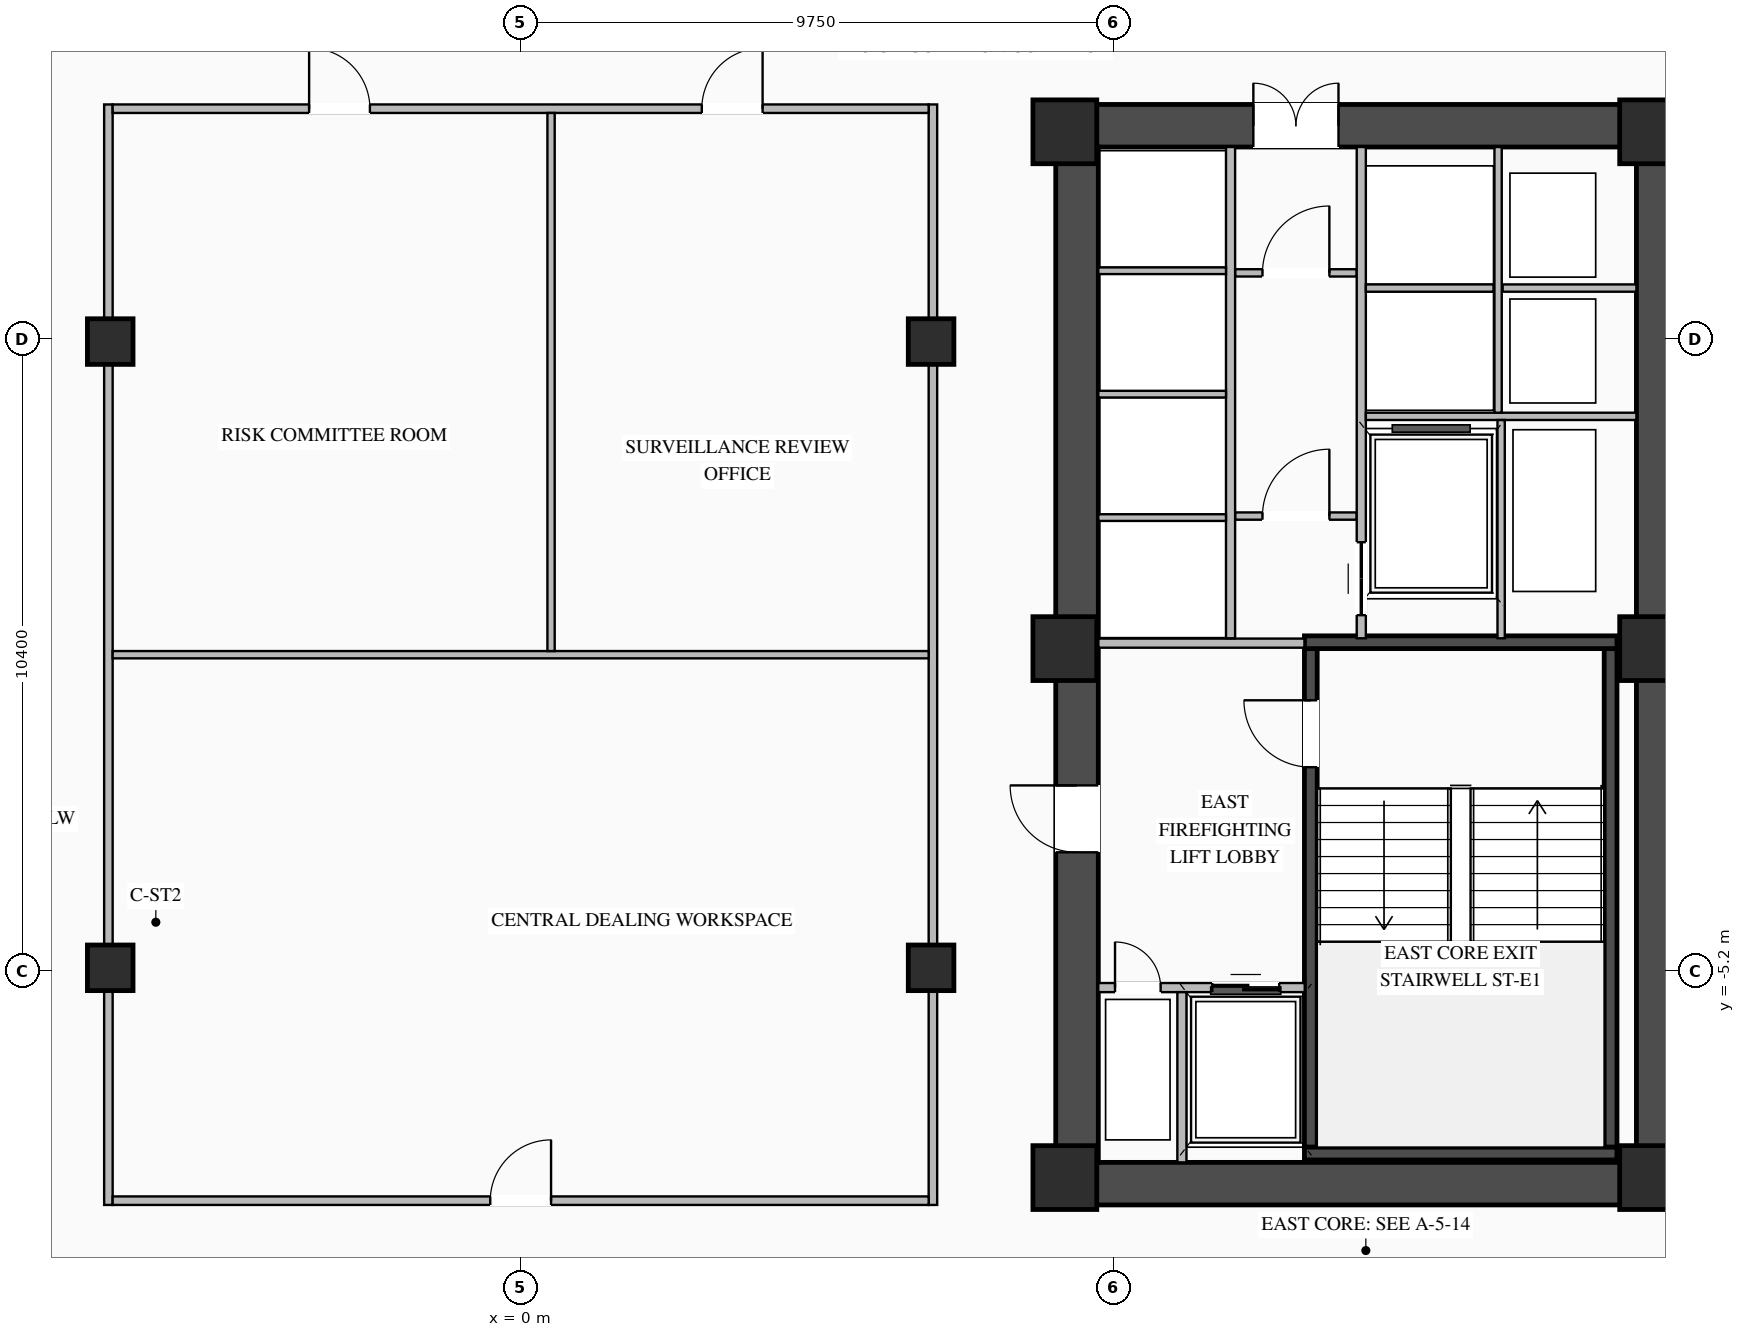
"""IFC4 building model, lengths in metres.
Left out: names, types, materials, properties, quantities, classifications, styles, units other than length and angle.
Written with IfcOpenShell. Run it as: python <this file> out.ifc"""

import sys

from ifc_helpers import new_model, si_unit, direction, frame, frame_2d, origin, origin_2d, place, context, subcontext, project, spatial, rectangle, i_section, extrude, element, fill, save


model = new_model("IFC4")
c1 = context("Model", 3, precision=1e-05, world=origin(), true_north=direction((0.0, 1.0)))
c2 = subcontext(c1, "Body", "Model", "MODEL_VIEW")
j1 = project(units=[si_unit("LENGTHUNIT", "METRE"), si_unit("PLANEANGLEUNIT", "RADIAN")], contexts=[c1])
p1 = place(None, origin())
s1 = spatial("IfcSite", under=j1, at=p1, CompositionType="ELEMENT")
p2 = place(p1, origin())
s2 = spatial("IfcBuilding", under=s1, at=p2, CompositionType="ELEMENT")
p3 = place(p2, frame((0.0, 0.0, 94.9)))
s3 = spatial("IfcBuildingStorey", under=s2, at=p3, CompositionType="ELEMENT", Elevation=94.9)
p4 = place(p3, frame((8.8, -8.7, 0.0), z_axis=(0.0, 0.0, 1.0), x_axis=(1.0, 0.0, 0.0)))
e1 = element("IfcWall", 1, at=p4, inside=s3, PredefinedType="SHEAR", context=c2, shape_type="SweptSolid", body=[
    extrude(rectangle(XDim=10.25, YDim=0.7, at=frame_2d((5.125, 0.0))), origin(), (0.0, 0.0, 1.0), 3.27),
])
p5 = place(p3, frame((8.8, 8.7, 0.0), z_axis=(0.0, 0.0, 1.0), x_axis=(1.0, 0.0, 0.0)))
e2 = element("IfcWall", 2, at=p5, inside=s3, PredefinedType="SHEAR", context=c2, shape_type="SweptSolid", body=[
    extrude(rectangle(XDim=10.25, YDim=0.7, at=frame_2d((5.125, 0.0))), origin(), (0.0, 0.0, 1.0), 3.27),
])
p6 = place(p5, frame((3.25, 0.0, 0.0)))
e3 = element("IfcOpeningElement", 3, at=p6, cuts=e2, PredefinedType="OPENING", context=c2, shape_type="SweptSolid", body=[
    extrude(rectangle(XDim=1.4, YDim=2.05, at=frame_2d((0.7, 1.025))), frame((0.0, 0.36, 0.0), z_axis=(0.0, -1.0, 0.0), x_axis=(1.0, 0.0, 0.0)), (0.0, 0.0, 1.0), 0.72),
])
p7 = place(p3, frame((9.15, -8.35, 0.0), z_axis=(0.0, 0.0, 1.0), x_axis=(0.0, 1.0, 0.0)))
e4 = element("IfcWall", 4, at=p7, inside=s3, PredefinedType="SHEAR", context=c2, shape_type="SweptSolid", body=[
    extrude(rectangle(XDim=16.7, YDim=0.7, at=frame_2d((8.35, 0.0))), origin(), (0.0, 0.0, 1.0), 3.27),
])
p8 = place(p7, frame((5.1, 0.0, 0.0)))
e5 = element("IfcOpeningElement", 5, at=p8, cuts=e4, PredefinedType="OPENING", context=c2, shape_type="SweptSolid", body=[
    extrude(rectangle(XDim=1.1, YDim=2.08, at=frame_2d((0.55, 1.04))), frame((0.0, 0.36, 0.0), z_axis=(0.0, -1.0, 0.0), x_axis=(1.0, 0.0, 0.0)), (0.0, 0.0, 1.0), 0.72),
])
p9 = place(p3, frame((18.7, -8.35, 0.0), z_axis=(0.0, 0.0, 1.0), x_axis=(0.0, 1.0, 0.0)))
e6 = element("IfcWall", 6, at=p9, inside=s3, PredefinedType="SHEAR", context=c2, shape_type="SweptSolid", body=[
    extrude(rectangle(XDim=16.7, YDim=0.7, at=frame_2d((8.35, 0.0))), origin(), (0.0, 0.0, 1.0), 3.27),
])
p10 = place(p3, frame((12.995, -8.1, 0.0), z_axis=(0.0, 0.0, 1.0), x_axis=(0.0, 1.0, 0.0)))
e7 = element("IfcWall", 7, at=p10, inside=s3, PredefinedType="SHEAR", context=c2, shape_type="SweptSolid", body=[
    extrude(rectangle(XDim=8.2, YDim=0.21, at=frame_2d((4.1, 0.0))), origin(), (0.0, 0.0, 1.0), 3.27),
])
p11 = place(p10, frame((6.25, 0.0, 0.0)))
e8 = element("IfcOpeningElement", 8, at=p11, cuts=e7, PredefinedType="OPENING", context=c2, shape_type="SweptSolid", body=[
    extrude(rectangle(XDim=1.1, YDim=2.15, at=frame_2d((0.55, 1.075))), frame((0.0, 0.115, 0.0), z_axis=(0.0, -1.0, 0.0), x_axis=(1.0, 0.0, 0.0)), (0.0, 0.0, 1.0), 0.23),
])
p12 = place(p3, frame((17.925, -8.1, 0.0), z_axis=(0.0, 0.0, 1.0), x_axis=(0.0, 1.0, 0.0)))
e9 = element("IfcWall", 9, at=p12, inside=s3, PredefinedType="SHEAR", context=c2, shape_type="SweptSolid", body=[
    extrude(rectangle(XDim=8.2, YDim=0.21, at=frame_2d((4.1, 0.0))), origin(), (0.0, 0.0, 1.0), 3.27),
])
for number, where, z_axis, x_axis in (
    (10, (12.89, -8.205, 0.0), (0.0, 0.0, 1.0), (1.0, 0.0, 0.0)),
    (11, (18.03, 0.205, 0.0), (0.0, 0.0, 1.0), (-1.0, 0.0, 0.0)),
):
    element("IfcWall", number, at=place(p3, frame(where, z_axis=z_axis, x_axis=x_axis)), inside=s3, PredefinedType="SHEAR", context=c2, shape_type="SweptSolid", body=[
        extrude(rectangle(XDim=5.14, YDim=0.21, at=frame_2d((2.57, 0.0))), origin(), (0.0, 0.0, 1.0), 3.27),
    ])
for number, where, z_axis, x_axis in (
    (12, (8.95, -8.6, 0.0), (0.0, 0.0, 1.0), (1.0, 0.0, 0.0)),
    (13, (8.95, 0.1, 0.0), (0.0, 0.0, 1.0), (1.0, 0.0, 0.0)),
    (14, (8.95, 8.6, 0.0), (0.0, 0.0, 1.0), (1.0, 0.0, 0.0)),
    (15, (18.6, -8.6, 0.0), (0.0, 0.0, 1.0), (1.0, 0.0, 0.0)),
    (16, (18.6, 0.1, 0.0), (0.0, 0.0, 1.0), (1.0, 0.0, 0.0)),
    (17, (18.6, 8.6, 0.0), (0.0, 0.0, 1.0), (1.0, 0.0, 0.0)),
):
    element("IfcColumn", number, at=place(p3, frame(where, z_axis=z_axis, x_axis=x_axis)), inside=s3, PredefinedType="COLUMN", context=c2, shape_type="SweptSolid", body=[
        extrude(rectangle(XDim=1.05, YDim=1.05, at=origin_2d()), origin(), (0.0, 0.0, 1.0), 3.45),
    ])
for number, where, z_axis, x_axis in (
    (18, (-6.75, -5.15, 0.0), (0.0, 0.0, 1.0), (1.0, 0.0, 0.0)),
    (19, (-6.75, 5.15, 0.0), (0.0, 0.0, 1.0), (1.0, 0.0, 0.0)),
    (20, (6.75, -5.15, 0.0), (0.0, 0.0, 1.0), (1.0, 0.0, 0.0)),
    (21, (6.75, 5.15, 0.0), (0.0, 0.0, 1.0), (1.0, 0.0, 0.0)),
):
    element("IfcColumn", number, at=place(p3, frame(where, z_axis=z_axis, x_axis=x_axis)), inside=s3, PredefinedType="COLUMN", context=c2, shape_type="SweptSolid", body=[
        extrude(i_section(OverallWidth=0.75, OverallDepth=0.75, WebThickness=0.03, FlangeThickness=0.044, at=origin_2d()), origin(), (0.0, 0.0, 1.0), 3.45),
    ])
p13 = place(p3, frame((9.5, -5.475, 0.0), z_axis=(0.0, 0.0, 1.0), x_axis=(1.0, 0.0, 0.0)))
e22 = element("IfcWall", 22, at=p13, inside=s3, PredefinedType="STANDARD", context=c2, shape_type="SweptSolid", body=[
    extrude(rectangle(XDim=3.395, YDim=0.15, at=frame_2d((1.698, 0.0))), origin(), (0.0, 0.0, 1.0), 3.25),
])
p14 = place(p13, frame((1.875, 0.0, 0.0)))
e23 = element("IfcOpeningElement", 23, at=p14, cuts=e22, PredefinedType="OPENING", context=c2, shape_type="SweptSolid", body=[
    extrude(rectangle(XDim=1.1, YDim=2.15, at=frame_2d((0.55, 1.075))), frame((0.0, 0.085, 0.0), z_axis=(0.0, -1.0, 0.0), x_axis=(1.0, 0.0, 0.0)), (0.0, 0.0, 1.0), 0.17),
])
p15 = place(p13, frame((0.275, 0.0, 0.0)))
e24 = element("IfcOpeningElement", 24, at=p15, cuts=e22, PredefinedType="OPENING", context=c2, shape_type="SweptSolid", body=[
    extrude(rectangle(XDim=0.75, YDim=2.05, at=frame_2d((0.375, 1.025))), frame((0.0, 0.085, 0.0), z_axis=(0.0, -1.0, 0.0), x_axis=(1.0, 0.0, 0.0)), (0.0, 0.0, 1.0), 0.17),
])
p16 = place(p3, frame((10.875, -8.35, 0.0), z_axis=(0.0, 0.0, 1.0), x_axis=(0.0, 1.0, 0.0)))
e25 = element("IfcWall", 25, at=p16, inside=s3, PredefinedType="STANDARD", context=c2, shape_type="SweptSolid", body=[
    extrude(rectangle(XDim=2.8, YDim=0.15, at=frame_2d((1.4, 0.0))), origin(), (0.0, 0.0, 1.0), 3.25),
])
p17 = place(p3, frame((9.5, 0.19, 0.0), z_axis=(0.0, 0.0, 1.0), x_axis=(1.0, 0.0, 0.0)))
e26 = element("IfcWall", 26, at=p17, inside=s3, PredefinedType="STANDARD", context=c2, shape_type="SweptSolid", body=[
    extrude(rectangle(XDim=3.39, YDim=0.15, at=frame_2d((1.695, 0.0))), origin(), (0.0, 0.0, 1.0), 2.645),
])
p18 = place(p3, frame((11.75, 2.28, 0.0), z_axis=(0.0, 0.0, 1.0), x_axis=(1.0, 0.0, 0.0)))
e27 = element("IfcWall", 27, at=p18, inside=s3, PredefinedType="STANDARD", context=c2, shape_type="SweptSolid", body=[
    extrude(rectangle(XDim=2.0, YDim=0.12, at=frame_2d((1.0, 0.0))), origin(), (0.0, 0.0, 1.0), 3.25),
])
p19 = place(p18, frame((0.45, 0.0, 0.0)))
e28 = element("IfcOpeningElement", 28, at=p19, cuts=e27, PredefinedType="OPENING", context=c2, shape_type="SweptSolid", body=[
    extrude(rectangle(XDim=1.1, YDim=2.1, at=frame_2d((0.55, 1.05))), frame((0.0, 0.07, 0.0), z_axis=(0.0, -1.0, 0.0), x_axis=(1.0, 0.0, 0.0)), (0.0, 0.0, 1.0), 0.14),
])
p20 = place(p3, frame((11.75, 6.28, 0.0), z_axis=(0.0, 0.0, 1.0), x_axis=(1.0, 0.0, 0.0)))
e29 = element("IfcWall", 29, at=p20, inside=s3, PredefinedType="STANDARD", context=c2, shape_type="SweptSolid", body=[
    extrude(rectangle(XDim=2.0, YDim=0.12, at=frame_2d((1.0, 0.0))), origin(), (0.0, 0.0, 1.0), 3.25),
])
p21 = place(p20, frame((0.45, 0.0, 0.0)))
e30 = element("IfcOpeningElement", 30, at=p21, cuts=e29, PredefinedType="OPENING", context=c2, shape_type="SweptSolid", body=[
    extrude(rectangle(XDim=1.1, YDim=2.1, at=frame_2d((0.55, 1.05))), frame((0.0, 0.07, 0.0), z_axis=(0.0, -1.0, 0.0), x_axis=(1.0, 0.0, 0.0)), (0.0, 0.0, 1.0), 0.14),
])
p22 = place(p3, frame((11.675, 0.27, 0.0), z_axis=(0.0, 0.0, 1.0), x_axis=(0.0, 1.0, 0.0)))
e31 = element("IfcWall", 31, at=p22, inside=s3, PredefinedType="STANDARD", context=c2, shape_type="SweptSolid", body=[
    extrude(rectangle(XDim=8.08, YDim=0.15, at=frame_2d((4.04, 0.0))), origin(), (0.0, 0.0, 1.0), 3.25),
])
for number, where, z_axis, x_axis in (
    (32, (9.5, 2.255, 0.0), (0.0, 0.0, 1.0), (1.0, 0.0, 0.0)),
    (33, (9.5, 4.285, 0.0), (0.0, 0.0, 1.0), (1.0, 0.0, 0.0)),
    (34, (9.5, 6.315, 0.0), (0.0, 0.0, 1.0), (1.0, 0.0, 0.0)),
):
    element("IfcWall", number, at=place(p3, frame(where, z_axis=z_axis, x_axis=x_axis)), inside=s3, PredefinedType="STANDARD", context=c2, shape_type="SweptSolid", body=[
        extrude(rectangle(XDim=2.1, YDim=0.11, at=frame_2d((1.05, 0.0))), origin(), (0.0, 0.0, 1.0), 3.25),
    ])
p23 = place(p3, frame((13.825, 0.27, 0.0), z_axis=(0.0, 0.0, 1.0), x_axis=(0.0, 1.0, 0.0)))
e35 = element("IfcWall", 35, at=p23, inside=s3, PredefinedType="STANDARD", context=c2, shape_type="SweptSolid", body=[
    extrude(rectangle(XDim=8.08, YDim=0.15, at=frame_2d((4.04, 0.0))), origin(), (0.0, 0.0, 1.0), 3.25),
])
p24 = place(p23, frame((0.38, 0.0, 0.0)))
e36 = element("IfcOpeningElement", 36, at=p24, cuts=e35, PredefinedType="OPENING", context=c2, shape_type="SweptSolid", body=[
    extrude(rectangle(XDim=1.2, YDim=2.1, at=frame_2d((0.6, 1.05))), frame((0.0, 0.085, 0.0), z_axis=(0.0, -1.0, 0.0), x_axis=(1.0, 0.0, 0.0)), (0.0, 0.0, 1.0), 0.17),
])
p25 = place(p3, frame((13.9, 3.92, 0.0), z_axis=(0.0, 0.0, 1.0), x_axis=(1.0, 0.0, 0.0)))
e37 = element("IfcWall", 37, at=p25, inside=s3, PredefinedType="STANDARD", context=c2, shape_type="SweptSolid", body=[
    extrude(rectangle(XDim=4.45, YDim=0.12, at=frame_2d((2.225, 0.0))), origin(), (0.0, 0.0, 1.0), 3.25),
])
p26 = place(p3, frame((16.15, 6.03, 0.0), z_axis=(0.0, 0.0, 1.0), x_axis=(1.0, 0.0, 0.0)))
e38 = element("IfcWall", 38, at=p26, inside=s3, PredefinedType="STANDARD", context=c2, shape_type="SweptSolid", body=[
    extrude(rectangle(XDim=2.2, YDim=0.12, at=frame_2d((1.1, 0.0))), origin(), (0.0, 0.0, 1.0), 3.25),
])
p27 = place(p3, frame((16.075, 3.98, 0.0), z_axis=(0.0, 0.0, 1.0), x_axis=(0.0, 1.0, 0.0)))
e39 = element("IfcWall", 39, at=p27, inside=s3, PredefinedType="STANDARD", context=c2, shape_type="SweptSolid", body=[
    extrude(rectangle(XDim=4.37, YDim=0.12, at=frame_2d((2.185, 0.0))), origin(), (0.0, 0.0, 1.0), 3.25),
])
p28 = place(p3, frame((13.9, 6.03, 0.0), z_axis=(0.0, 0.0, 1.0), x_axis=(1.0, 0.0, 0.0)))
e40 = element("IfcWall", 40, at=p28, inside=s3, PredefinedType="STANDARD", context=c2, shape_type="SweptSolid", body=[
    extrude(rectangle(XDim=2.1, YDim=0.12, at=frame_2d((1.05, 0.0))), origin(), (0.0, 0.0, 1.0), 3.25),
])
p29 = place(p3, frame((16.125, 0.27, 0.0), z_axis=(0.0, 0.0, 1.0), x_axis=(0.0, 1.0, 0.0)))
e41 = element("IfcWall", 41, at=p29, inside=s3, PredefinedType="STANDARD", context=c2, shape_type="SweptSolid", body=[
    extrude(rectangle(XDim=3.59, YDim=0.12, at=frame_2d((1.795, 0.0))), origin(), (0.0, 0.0, 1.0), 3.25),
])
for number, where, z_axis, x_axis in (
    (42, (-6.78, -9.05, 0.0), (0.0, 0.0, 1.0), (0.0, 1.0, 0.0)),
    (43, (6.78, -9.05, 0.0), (0.0, 0.0, 1.0), (0.0, 1.0, 0.0)),
):
    element("IfcWall", number, at=place(p3, frame(where, z_axis=z_axis, x_axis=x_axis)), inside=s3, PredefinedType="STANDARD", context=c2, shape_type="SweptSolid", body=[
        extrude(rectangle(XDim=18.1, YDim=0.14, at=frame_2d((9.05, 0.0))), origin(), (0.0, 0.0, 1.0), 2.645),
    ])
p30 = place(p3, frame((-6.71, -8.98, 0.0), z_axis=(0.0, 0.0, 1.0), x_axis=(1.0, 0.0, 0.0)))
e44 = element("IfcWall", 44, at=p30, inside=s3, PredefinedType="STANDARD", context=c2, shape_type="SweptSolid", body=[
    extrude(rectangle(XDim=13.42, YDim=0.14, at=frame_2d((6.71, 0.0))), origin(), (0.0, 0.0, 1.0), 3.25),
])
p31 = place(p30, frame((6.21, 0.0, 0.0)))
e45 = element("IfcOpeningElement", 45, at=p31, cuts=e44, PredefinedType="OPENING", context=c2, shape_type="SweptSolid", body=[
    extrude(rectangle(XDim=1.0, YDim=2.08, at=frame_2d((0.5, 1.04))), frame((0.0, 0.08, 0.0), z_axis=(0.0, -1.0, 0.0), x_axis=(1.0, 0.0, 0.0)), (0.0, 0.0, 1.0), 0.16),
])
p32 = place(p3, frame((-6.71, 8.98, 0.0), z_axis=(0.0, 0.0, 1.0), x_axis=(1.0, 0.0, 0.0)))
e46 = element("IfcWall", 46, at=p32, inside=s3, PredefinedType="STANDARD", context=c2, shape_type="SweptSolid", body=[
    extrude(rectangle(XDim=13.42, YDim=0.14, at=frame_2d((6.71, 0.0))), origin(), (0.0, 0.0, 1.0), 3.25),
])
p33 = place(p32, frame((3.231, 0.0, 0.0)))
e47 = element("IfcOpeningElement", 47, at=p33, cuts=e46, PredefinedType="OPENING", context=c2, shape_type="SweptSolid", body=[
    extrude(rectangle(XDim=1.0, YDim=2.08, at=frame_2d((0.5, 1.04))), frame((0.0, 0.08, 0.0), z_axis=(0.0, -1.0, 0.0), x_axis=(1.0, 0.0, 0.0)), (0.0, 0.0, 1.0), 0.16),
])
p34 = place(p32, frame((9.689, 0.0, 0.0)))
e48 = element("IfcOpeningElement", 48, at=p34, cuts=e46, PredefinedType="OPENING", context=c2, shape_type="SweptSolid", body=[
    extrude(rectangle(XDim=1.0, YDim=2.08, at=frame_2d((0.5, 1.04))), frame((0.0, 0.08, 0.0), z_axis=(0.0, -1.0, 0.0), x_axis=(1.0, 0.0, 0.0)), (0.0, 0.0, 1.0), 0.16),
])
p35 = place(p3, frame((-6.71, 0.0, 0.0), z_axis=(0.0, 0.0, 1.0), x_axis=(1.0, 0.0, 0.0)))
e49 = element("IfcWall", 49, at=p35, inside=s3, PredefinedType="STANDARD", context=c2, shape_type="SweptSolid", body=[
    extrude(rectangle(XDim=13.42, YDim=0.12, at=frame_2d((6.71, 0.0))), origin(), (0.0, 0.0, 1.0), 3.25),
])
p36 = place(p3, frame((0.5, 0.06, 0.0), z_axis=(0.0, 0.0, 1.0), x_axis=(0.0, 1.0, 0.0)))
e50 = element("IfcWall", 50, at=p36, inside=s3, PredefinedType="STANDARD", context=c2, shape_type="SweptSolid", body=[
    extrude(rectangle(XDim=8.85, YDim=0.12, at=frame_2d((4.425, 0.0))), origin(), (0.0, 0.0, 1.0), 3.25),
])
p37 = place(p11, origin())
e51 = element("IfcDoor", 51, at=p37, inside=s3, OperationType="SINGLE_SWING_RIGHT", PredefinedType="DOOR", context=c2, shape_type="SweptSolid", body=[
    extrude(rectangle(XDim=1.1, YDim=2.15, at=frame_2d((0.55, 1.075))), frame((0.0, 0.025, 0.0), z_axis=(0.0, -1.0, 0.0), x_axis=(1.0, 0.0, 0.0)), (0.0, 0.0, 1.0), 0.05),
])
fill(e8, e51)
p38 = place(p14, origin())
e52 = element("IfcDoor", 52, at=p38, inside=s3, OperationType="DOUBLE_DOOR_SLIDING", PredefinedType="DOOR", context=c2, shape_type="SweptSolid", body=[
    extrude(rectangle(XDim=1.1, YDim=2.15, at=frame_2d((0.55, 1.075))), frame((0.0, 0.025, 0.0), z_axis=(0.0, -1.0, 0.0), x_axis=(1.0, 0.0, 0.0)), (0.0, 0.0, 1.0), 0.05),
])
fill(e23, e52)
p39 = place(p15, origin())
e53 = element("IfcDoor", 53, at=p39, inside=s3, OperationType="SINGLE_SWING_LEFT", PredefinedType="DOOR", context=c2, shape_type="SweptSolid", body=[
    extrude(rectangle(XDim=0.75, YDim=2.05, at=frame_2d((0.375, 1.025))), frame((0.0, 0.025, 0.0), z_axis=(0.0, -1.0, 0.0), x_axis=(1.0, 0.0, 0.0)), (0.0, 0.0, 1.0), 0.05),
])
fill(e24, e53)
p40 = place(p8, origin())
e54 = element("IfcDoor", 54, at=p40, inside=s3, OperationType="SINGLE_SWING_RIGHT", PredefinedType="DOOR", context=c2, shape_type="SweptSolid", body=[
    extrude(rectangle(XDim=1.1, YDim=2.08, at=frame_2d((0.55, 1.04))), frame((0.0, -0.255, 0.0), z_axis=(0.0, -1.0, 0.0), x_axis=(1.0, 0.0, 0.0)), (0.0, 0.0, 1.0), 0.05),
])
fill(e5, e54)
p41 = place(p19, origin())
e55 = element("IfcDoor", 55, at=p41, inside=s3, OperationType="SINGLE_SWING_RIGHT", PredefinedType="DOOR", context=c2, shape_type="SweptSolid", body=[
    extrude(rectangle(XDim=1.1, YDim=2.1, at=frame_2d((0.55, 1.05))), frame((0.0, 0.025, 0.0), z_axis=(0.0, -1.0, 0.0), x_axis=(1.0, 0.0, 0.0)), (0.0, 0.0, 1.0), 0.05),
])
fill(e28, e55)
p42 = place(p21, origin())
e56 = element("IfcDoor", 56, at=p42, inside=s3, OperationType="SINGLE_SWING_RIGHT", PredefinedType="DOOR", context=c2, shape_type="SweptSolid", body=[
    extrude(rectangle(XDim=1.1, YDim=2.1, at=frame_2d((0.55, 1.05))), frame((0.0, 0.025, 0.0), z_axis=(0.0, -1.0, 0.0), x_axis=(1.0, 0.0, 0.0)), (0.0, 0.0, 1.0), 0.05),
])
fill(e30, e56)
p43 = place(p6, origin())
e57 = element("IfcDoor", 57, at=p43, inside=s3, OperationType="DOUBLE_DOOR_SINGLE_SWING", PredefinedType="DOOR", context=c2, shape_type="SweptSolid", body=[
    extrude(rectangle(XDim=1.4, YDim=2.05, at=frame_2d((0.7, 1.025))), frame((0.0, 0.295, 0.0), z_axis=(0.0, -1.0, 0.0), x_axis=(1.0, 0.0, 0.0)), (0.0, 0.0, 1.0), 0.05),
])
fill(e3, e57)
p44 = place(p24, origin())
e58 = element("IfcDoor", 58, at=p44, inside=s3, OperationType="DOUBLE_DOOR_SLIDING", PredefinedType="DOOR", context=c2, shape_type="SweptSolid", body=[
    extrude(rectangle(XDim=1.2, YDim=2.1, at=frame_2d((0.6, 1.05))), frame((0.0, 0.025, 0.0), z_axis=(0.0, -1.0, 0.0), x_axis=(1.0, 0.0, 0.0)), (0.0, 0.0, 1.0), 0.05),
])
fill(e36, e58)
p45 = place(p31, origin())
e59 = element("IfcDoor", 59, at=p45, inside=s3, OperationType="SINGLE_SWING_RIGHT", PredefinedType="DOOR", context=c2, shape_type="SweptSolid", body=[
    extrude(rectangle(XDim=1.0, YDim=2.08, at=frame_2d((0.5, 1.04))), frame((0.0, 0.025, 0.0), z_axis=(0.0, -1.0, 0.0), x_axis=(1.0, 0.0, 0.0)), (0.0, 0.0, 1.0), 0.05),
])
fill(e45, e59)
p46 = place(p33, origin())
e60 = element("IfcDoor", 60, at=p46, inside=s3, OperationType="SINGLE_SWING_LEFT", PredefinedType="DOOR", context=c2, shape_type="SweptSolid", body=[
    extrude(rectangle(XDim=1.0, YDim=2.08, at=frame_2d((0.5, 1.04))), frame((0.0, 0.025, 0.0), z_axis=(0.0, -1.0, 0.0), x_axis=(1.0, 0.0, 0.0)), (0.0, 0.0, 1.0), 0.05),
])
fill(e47, e60)
p47 = place(p34, origin())
e61 = element("IfcDoor", 61, at=p47, inside=s3, OperationType="SINGLE_SWING_RIGHT", PredefinedType="DOOR", context=c2, shape_type="SweptSolid", body=[
    extrude(rectangle(XDim=1.0, YDim=2.08, at=frame_2d((0.5, 1.04))), frame((0.0, 0.025, 0.0), z_axis=(0.0, -1.0, 0.0), x_axis=(1.0, 0.0, 0.0)), (0.0, 0.0, 1.0), 0.05),
])
fill(e48, e61)
save(model, sys.argv[1])
